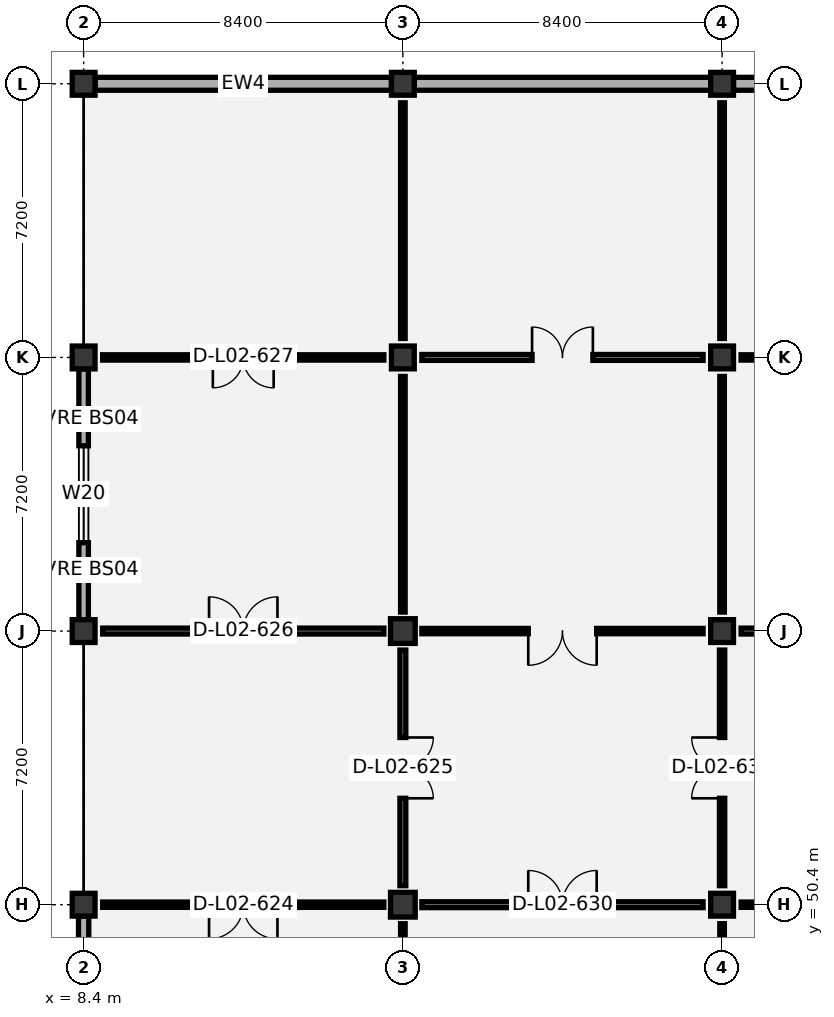
"""IFC4 building model, lengths in metres.
Left out: names, types, materials, properties, quantities, classifications, styles, units other than length and angle.
Written with IfcOpenShell. Run it as: python <this file> out.ifc"""

import sys

from ifc_helpers import new_model, si_unit, direction, frame, frame_2d, origin, origin_2d, place, context, subcontext, project, spatial, rectangle, extrude, element, fill, save


model = new_model("IFC4")
c1 = context("Model", 3, precision=1e-05, world=origin(), true_north=direction((0.0, 1.0)))
c2 = subcontext(c1, "Body", "Model", "MODEL_VIEW")
j1 = project(units=[si_unit("LENGTHUNIT", "METRE"), si_unit("PLANEANGLEUNIT", "RADIAN")], contexts=[c1])
p1 = place(None, origin())
s1 = spatial("IfcSite", under=j1, at=p1, CompositionType="ELEMENT")
p2 = place(p1, origin())
s2 = spatial("IfcBuilding", under=s1, at=p2, CompositionType="ELEMENT")
p3 = place(p2, frame((0.0, 0.0, 11.4)))
s3 = spatial("IfcBuildingStorey", under=s2, at=p3, CompositionType="ELEMENT", Elevation=11.4)
for number, where, z_axis, x_axis in (
    (1, (8.4, 50.4, 0.0), (0.0, 0.0, 1.0), (1.0, 0.0, 0.0)),
    (2, (8.4, 57.6, 0.0), (0.0, 0.0, 1.0), (1.0, 0.0, 0.0)),
    (3, (8.4, 64.8, 0.0), (0.0, 0.0, 1.0), (1.0, 0.0, 0.0)),
    (4, (8.4, 72.0, 0.0), (0.0, 0.0, 1.0), (1.0, 0.0, 0.0)),
):
    element("IfcColumn", number, at=place(p3, frame(where, z_axis=z_axis, x_axis=x_axis)), inside=s3, PredefinedType="COLUMN", context=c2, shape_type="SweptSolid", body=[
        extrude(rectangle(XDim=0.6, YDim=0.6, at=origin_2d()), origin(), (0.0, 0.0, 1.0), 5.4),
    ])
for number, where, z_axis, x_axis in (
    (5, (16.8, 50.4, 0.0), (0.0, 0.0, 1.0), (1.0, 0.0, 0.0)),
    (6, (16.8, 57.6, 0.0), (0.0, 0.0, 1.0), (1.0, 0.0, 0.0)),
):
    element("IfcColumn", number, at=place(p3, frame(where, z_axis=z_axis, x_axis=x_axis)), inside=s3, PredefinedType="COLUMN", context=c2, shape_type="SweptSolid", body=[
        extrude(rectangle(XDim=0.65, YDim=0.65, at=origin_2d()), origin(), (0.0, 0.0, 1.0), 5.4),
    ])
for number, where, z_axis, x_axis in (
    (7, (16.8, 64.8, 0.0), (0.0, 0.0, 1.0), (1.0, 0.0, 0.0)),
    (8, (16.8, 72.0, 0.0), (0.0, 0.0, 1.0), (1.0, 0.0, 0.0)),
    (9, (25.2, 50.4, 0.0), (0.0, 0.0, 1.0), (1.0, 0.0, 0.0)),
    (10, (25.2, 57.6, 0.0), (0.0, 0.0, 1.0), (1.0, 0.0, 0.0)),
    (11, (25.2, 64.8, 0.0), (0.0, 0.0, 1.0), (1.0, 0.0, 0.0)),
    (12, (25.2, 72.0, 0.0), (0.0, 0.0, 1.0), (1.0, 0.0, 0.0)),
):
    element("IfcColumn", number, at=place(p3, frame(where, z_axis=z_axis, x_axis=x_axis)), inside=s3, PredefinedType="COLUMN", context=c2, shape_type="SweptSolid", body=[
        extrude(rectangle(XDim=0.6, YDim=0.6, at=origin_2d()), origin(), (0.0, 0.0, 1.0), 5.4),
    ])
p4 = place(p3, frame((8.4, 43.5, 0.0), z_axis=(0.0, 0.0, 1.0), x_axis=(0.0, 1.0, 0.0)))
e13 = element("IfcWall", 13, at=p4, inside=s3, PredefinedType="SOLIDWALL", context=c2, shape_type="SweptSolid", body=[
    extrude(rectangle(XDim=6.6, YDim=0.27, at=frame_2d((3.3, 0.0))), origin(), (0.0, 0.0, 1.0), 4.445),
])
p5 = place(p4, frame((1.8, 0.0, 0.9)))
e14 = element("IfcOpeningElement", 14, at=p5, cuts=e13, PredefinedType="OPENING", context=c2, shape_type="SweptSolid", body=[
    extrude(rectangle(XDim=3.0, YDim=2.4, at=frame_2d((1.5, 1.2))), frame((0.0, 0.145, 0.0), z_axis=(0.0, -1.0, 0.0), x_axis=(1.0, 0.0, 0.0)), (0.0, 0.0, 1.0), 0.29),
])
p6 = place(p3, frame((8.4, 57.9, 0.0), z_axis=(0.0, 0.0, 1.0), x_axis=(0.0, 1.0, 0.0)))
e15 = element("IfcWall", 15, at=p6, inside=s3, PredefinedType="SOLIDWALL", context=c2, shape_type="SweptSolid", body=[
    extrude(rectangle(XDim=6.6, YDim=0.25, at=frame_2d((3.3, 0.0))), origin(), (0.0, 0.0, 1.0), 4.445),
])
p7 = place(p6, frame((2.025, 0.0, 0.9)))
e16 = element("IfcOpeningElement", 16, at=p7, cuts=e15, PredefinedType="OPENING", context=c2, shape_type="SweptSolid", body=[
    extrude(rectangle(XDim=2.55, YDim=1.95, at=frame_2d((1.275, 0.975))), frame((0.0, 0.135, 0.0), z_axis=(0.0, -1.0, 0.0), x_axis=(1.0, 0.0, 0.0)), (0.0, 0.0, 1.0), 0.27),
])
p8 = place(p3, frame((8.7, 72.0, 0.0), z_axis=(0.0, 0.0, 1.0), x_axis=(1.0, 0.0, 0.0)))
e17 = element("IfcWall", 17, at=p8, inside=s3, PredefinedType="SOLIDWALL", context=c2, shape_type="SweptSolid", body=[
    extrude(rectangle(XDim=7.8, YDim=0.34, at=frame_2d((3.9, 0.0))), origin(), (0.0, 0.0, 1.0), 4.445),
])
p9 = place(p3, frame((17.1, 72.0, 0.0), z_axis=(0.0, 0.0, 1.0), x_axis=(1.0, 0.0, 0.0)))
e18 = element("IfcWall", 18, at=p9, inside=s3, PredefinedType="SOLIDWALL", context=c2, shape_type="SweptSolid", body=[
    extrude(rectangle(XDim=7.8, YDim=0.34, at=frame_2d((3.9, 0.0))), origin(), (0.0, 0.0, 1.0), 4.445),
])
p10 = place(p3, frame((25.5, 72.0, 0.0), z_axis=(0.0, 0.0, 1.0), x_axis=(1.0, 0.0, 0.0)))
e19 = element("IfcWall", 19, at=p10, inside=s3, PredefinedType="SOLIDWALL", context=c2, shape_type="SweptSolid", body=[
    extrude(rectangle(XDim=7.8, YDim=0.34, at=frame_2d((3.9, 0.0))), origin(), (0.0, 0.0, 1.0), 4.445),
])
p11 = place(p3, frame((0.12, 72.0, 0.0), z_axis=(0.0, 0.0, 1.0), x_axis=(1.0, 0.0, 0.0)))
e20 = element("IfcWall", 20, at=p11, inside=s3, PredefinedType="PARAPET", context=c2, shape_type="SweptSolid", body=[
    extrude(rectangle(XDim=8.16, YDim=0.22, at=frame_2d((4.08, 0.0))), origin(), (0.0, 0.0, 1.0), 1.15),
])
p12 = place(p3, frame((16.8, 43.7, 0.0), z_axis=(0.0, 0.0, 1.0), x_axis=(0.0, 1.0, 0.0)))
e21 = element("IfcWall", 21, at=p12, inside=s3, PredefinedType="PARTITIONING", context=c2, shape_type="SweptSolid", body=[
    extrude(rectangle(XDim=6.2, YDim=0.12, at=frame_2d((3.1, 0.0))), origin(), (0.0, 0.0, 1.0), 4.445),
])
p13 = place(p3, frame((8.9, 50.4, 0.0), z_axis=(0.0, 0.0, 1.0), x_axis=(1.0, 0.0, 0.0)))
e22 = element("IfcWall", 22, at=p13, inside=s3, PredefinedType="PARTITIONING", context=c2, shape_type="SweptSolid", body=[
    extrude(rectangle(XDim=7.4, YDim=0.14, at=frame_2d((3.7, 0.0))), origin(), (0.0, 0.0, 1.0), 4.345),
])
p14 = place(p13, frame((2.8, 0.0, 0.0)))
e23 = element("IfcOpeningElement", 23, at=p14, cuts=e22, PredefinedType="OPENING", context=c2, shape_type="SweptSolid", body=[
    extrude(rectangle(XDim=1.8, YDim=2.25, at=frame_2d((0.9, 1.125))), frame((0.0, 0.08, 0.0), z_axis=(0.0, -1.0, 0.0), x_axis=(1.0, 0.0, 0.0)), (0.0, 0.0, 1.0), 0.16),
])
p15 = place(p3, frame((16.8, 50.9, 0.0), z_axis=(0.0, 0.0, 1.0), x_axis=(0.0, 1.0, 0.0)))
e24 = element("IfcWall", 24, at=p15, inside=s3, PredefinedType="PARTITIONING", context=c2, shape_type="SweptSolid", body=[
    extrude(rectangle(XDim=6.2, YDim=0.155, at=frame_2d((3.1, 0.0))), origin(), (0.0, 0.0, 1.0), 4.445),
])
p16 = place(p15, frame((2.3, 0.0, 0.0)))
e25 = element("IfcOpeningElement", 25, at=p16, cuts=e24, PredefinedType="OPENING", context=c2, shape_type="SweptSolid", body=[
    extrude(rectangle(XDim=1.6, YDim=2.2, at=frame_2d((0.8, 1.1))), frame((0.0, 0.087, 0.0), z_axis=(0.0, -1.0, 0.0), x_axis=(1.0, 0.0, 0.0)), (0.0, 0.0, 1.0), 0.175),
])
p17 = place(p3, frame((8.9, 57.6, 0.0), z_axis=(0.0, 0.0, 1.0), x_axis=(1.0, 0.0, 0.0)))
e26 = element("IfcWall", 26, at=p17, inside=s3, PredefinedType="PARTITIONING", context=c2, shape_type="SweptSolid", body=[
    extrude(rectangle(XDim=7.4, YDim=0.155, at=frame_2d((3.7, 0.0))), origin(), (0.0, 0.0, 1.0), 4.345),
])
p18 = place(p17, frame((2.8, 0.0, 0.0)))
e27 = element("IfcOpeningElement", 27, at=p18, cuts=e26, PredefinedType="OPENING", context=c2, shape_type="SweptSolid", body=[
    extrude(rectangle(XDim=1.8, YDim=2.25, at=frame_2d((0.9, 1.125))), frame((0.0, 0.087, 0.0), z_axis=(0.0, -1.0, 0.0), x_axis=(1.0, 0.0, 0.0)), (0.0, 0.0, 1.0), 0.175),
])
p19 = place(p3, frame((16.8, 58.1, 0.0), z_axis=(0.0, 0.0, 1.0), x_axis=(0.0, 1.0, 0.0)))
e28 = element("IfcWall", 28, at=p19, inside=s3, PredefinedType="PARTITIONING", context=c2, shape_type="SweptSolid", body=[
    extrude(rectangle(XDim=6.2, YDim=0.12, at=frame_2d((3.1, 0.0))), origin(), (0.0, 0.0, 1.0), 4.695),
])
p20 = place(p3, frame((8.9, 64.8, 0.0), z_axis=(0.0, 0.0, 1.0), x_axis=(1.0, 0.0, 0.0)))
e29 = element("IfcWall", 29, at=p20, inside=s3, PredefinedType="PARTITIONING", context=c2, shape_type="SweptSolid", body=[
    extrude(rectangle(XDim=7.4, YDim=0.14, at=frame_2d((3.7, 0.0))), origin(), (0.0, 0.0, 1.0), 4.345),
])
p21 = place(p20, frame((2.9, 0.0, 0.0)))
e30 = element("IfcOpeningElement", 30, at=p21, cuts=e29, PredefinedType="OPENING", context=c2, shape_type="SweptSolid", body=[
    extrude(rectangle(XDim=1.6, YDim=2.2, at=frame_2d((0.8, 1.1))), frame((0.0, 0.08, 0.0), z_axis=(0.0, -1.0, 0.0), x_axis=(1.0, 0.0, 0.0)), (0.0, 0.0, 1.0), 0.16),
])
p22 = place(p3, frame((16.8, 65.3, 0.0), z_axis=(0.0, 0.0, 1.0), x_axis=(0.0, 1.0, 0.0)))
e31 = element("IfcWall", 31, at=p22, inside=s3, PredefinedType="PARTITIONING", context=c2, shape_type="SweptSolid", body=[
    extrude(rectangle(XDim=6.2, YDim=0.12, at=frame_2d((3.1, 0.0))), origin(), (0.0, 0.0, 1.0), 4.395),
])
p23 = place(p3, frame((25.2, 43.7, 0.0), z_axis=(0.0, 0.0, 1.0), x_axis=(0.0, 1.0, 0.0)))
e32 = element("IfcWall", 32, at=p23, inside=s3, PredefinedType="PARTITIONING", context=c2, shape_type="SweptSolid", body=[
    extrude(rectangle(XDim=6.2, YDim=0.12, at=frame_2d((3.1, 0.0))), origin(), (0.0, 0.0, 1.0), 5.175),
])
p24 = place(p3, frame((17.3, 50.4, 0.0), z_axis=(0.0, 0.0, 1.0), x_axis=(1.0, 0.0, 0.0)))
e33 = element("IfcWall", 33, at=p24, inside=s3, PredefinedType="PARTITIONING", context=c2, shape_type="SweptSolid", body=[
    extrude(rectangle(XDim=7.4, YDim=0.155, at=frame_2d((3.7, 0.0))), origin(), (0.0, 0.0, 1.0), 5.175),
])
p25 = place(p24, frame((2.8, 0.0, 0.0)))
e34 = element("IfcOpeningElement", 34, at=p25, cuts=e33, PredefinedType="OPENING", context=c2, shape_type="SweptSolid", body=[
    extrude(rectangle(XDim=1.8, YDim=2.25, at=frame_2d((0.9, 1.125))), frame((0.0, 0.087, 0.0), z_axis=(0.0, -1.0, 0.0), x_axis=(1.0, 0.0, 0.0)), (0.0, 0.0, 1.0), 0.175),
])
p26 = place(p3, frame((25.2, 50.9, 0.0), z_axis=(0.0, 0.0, 1.0), x_axis=(0.0, 1.0, 0.0)))
e35 = element("IfcWall", 35, at=p26, inside=s3, PredefinedType="PARTITIONING", context=c2, shape_type="SweptSolid", body=[
    extrude(rectangle(XDim=6.2, YDim=0.14, at=frame_2d((3.1, 0.0))), origin(), (0.0, 0.0, 1.0), 5.175),
])
p27 = place(p26, frame((2.3, 0.0, 0.0)))
e36 = element("IfcOpeningElement", 36, at=p27, cuts=e35, PredefinedType="OPENING", context=c2, shape_type="SweptSolid", body=[
    extrude(rectangle(XDim=1.6, YDim=2.2, at=frame_2d((0.8, 1.1))), frame((0.0, 0.08, 0.0), z_axis=(0.0, -1.0, 0.0), x_axis=(1.0, 0.0, 0.0)), (0.0, 0.0, 1.0), 0.16),
])
p28 = place(p3, frame((17.3, 57.6, 0.0), z_axis=(0.0, 0.0, 1.0), x_axis=(1.0, 0.0, 0.0)))
e37 = element("IfcWall", 37, at=p28, inside=s3, PredefinedType="PARTITIONING", context=c2, shape_type="SweptSolid", body=[
    extrude(rectangle(XDim=7.4, YDim=0.14, at=frame_2d((3.7, 0.0))), origin(), (0.0, 0.0, 1.0), 4.445),
])
p29 = place(p28, frame((2.8, 0.0, 0.0)))
e38 = element("IfcOpeningElement", 38, at=p29, cuts=e37, PredefinedType="OPENING", context=c2, shape_type="SweptSolid", body=[
    extrude(rectangle(XDim=1.8, YDim=2.25, at=frame_2d((0.9, 1.125))), frame((0.0, 0.08, 0.0), z_axis=(0.0, -1.0, 0.0), x_axis=(1.0, 0.0, 0.0)), (0.0, 0.0, 1.0), 0.16),
])
p30 = place(p3, frame((25.2, 58.1, 0.0), z_axis=(0.0, 0.0, 1.0), x_axis=(0.0, 1.0, 0.0)))
e39 = element("IfcWall", 39, at=p30, inside=s3, PredefinedType="PARTITIONING", context=c2, shape_type="SweptSolid", body=[
    extrude(rectangle(XDim=6.2, YDim=0.12, at=frame_2d((3.1, 0.0))), origin(), (0.0, 0.0, 1.0), 4.395),
])
p31 = place(p3, frame((17.3, 64.8, 0.0), z_axis=(0.0, 0.0, 1.0), x_axis=(1.0, 0.0, 0.0)))
e40 = element("IfcWall", 40, at=p31, inside=s3, PredefinedType="PARTITIONING", context=c2, shape_type="SweptSolid", body=[
    extrude(rectangle(XDim=7.4, YDim=0.155, at=frame_2d((3.7, 0.0))), origin(), (0.0, 0.0, 1.0), 4.345),
])
p32 = place(p31, frame((2.9, 0.0, 0.0)))
e41 = element("IfcOpeningElement", 41, at=p32, cuts=e40, PredefinedType="OPENING", context=c2, shape_type="SweptSolid", body=[
    extrude(rectangle(XDim=1.6, YDim=2.2, at=frame_2d((0.8, 1.1))), frame((0.0, 0.087, 0.0), z_axis=(0.0, -1.0, 0.0), x_axis=(1.0, 0.0, 0.0)), (0.0, 0.0, 1.0), 0.175),
])
p33 = place(p3, frame((25.2, 65.3, 0.0), z_axis=(0.0, 0.0, 1.0), x_axis=(0.0, 1.0, 0.0)))
e42 = element("IfcWall", 42, at=p33, inside=s3, PredefinedType="PARTITIONING", context=c2, shape_type="SweptSolid", body=[
    extrude(rectangle(XDim=6.2, YDim=0.12, at=frame_2d((3.1, 0.0))), origin(), (0.0, 0.0, 1.0), 4.805),
])
p34 = place(p3, frame((25.7, 50.4, 0.0), z_axis=(0.0, 0.0, 1.0), x_axis=(1.0, 0.0, 0.0)))
e43 = element("IfcWall", 43, at=p34, inside=s3, PredefinedType="PARTITIONING", context=c2, shape_type="SweptSolid", body=[
    extrude(rectangle(XDim=7.4, YDim=0.14, at=frame_2d((3.7, 0.0))), origin(), (0.0, 0.0, 1.0), 5.175),
])
p35 = place(p34, frame((2.9, 0.0, 0.0)))
e44 = element("IfcOpeningElement", 44, at=p35, cuts=e43, PredefinedType="OPENING", context=c2, shape_type="SweptSolid", body=[
    extrude(rectangle(XDim=1.6, YDim=2.2, at=frame_2d((0.8, 1.1))), frame((0.0, 0.08, 0.0), z_axis=(0.0, -1.0, 0.0), x_axis=(1.0, 0.0, 0.0)), (0.0, 0.0, 1.0), 0.16),
])
p36 = place(p3, frame((25.7, 57.6, 0.0), z_axis=(0.0, 0.0, 1.0), x_axis=(1.0, 0.0, 0.0)))
e45 = element("IfcWall", 45, at=p36, inside=s3, PredefinedType="PARTITIONING", context=c2, shape_type="SweptSolid", body=[
    extrude(rectangle(XDim=7.4, YDim=0.155, at=frame_2d((3.7, 0.0))), origin(), (0.0, 0.0, 1.0), 4.445),
])
p37 = place(p36, frame((2.9, 0.0, 0.0)))
e46 = element("IfcOpeningElement", 46, at=p37, cuts=e45, PredefinedType="OPENING", context=c2, shape_type="SweptSolid", body=[
    extrude(rectangle(XDim=1.6, YDim=2.2, at=frame_2d((0.8, 1.1))), frame((0.0, 0.087, 0.0), z_axis=(0.0, -1.0, 0.0), x_axis=(1.0, 0.0, 0.0)), (0.0, 0.0, 1.0), 0.175),
])
p38 = place(p3, frame((25.7, 64.8, 0.0), z_axis=(0.0, 0.0, 1.0), x_axis=(1.0, 0.0, 0.0)))
e47 = element("IfcWall", 47, at=p38, inside=s3, PredefinedType="PARTITIONING", context=c2, shape_type="SweptSolid", body=[
    extrude(rectangle(XDim=7.4, YDim=0.14, at=frame_2d((3.7, 0.0))), origin(), (0.0, 0.0, 1.0), 4.345),
])
p39 = place(p38, frame((2.8, 0.0, 0.0)))
e48 = element("IfcOpeningElement", 48, at=p39, cuts=e47, PredefinedType="OPENING", context=c2, shape_type="SweptSolid", body=[
    extrude(rectangle(XDim=1.8, YDim=2.25, at=frame_2d((0.9, 1.125))), frame((0.0, 0.08, 0.0), z_axis=(0.0, -1.0, 0.0), x_axis=(1.0, 0.0, 0.0)), (0.0, 0.0, 1.0), 0.16),
])
p40 = place(p7, origin())
e49 = element("IfcWindow", 49, at=p40, inside=s3, PartitioningType="SINGLE_PANEL", PredefinedType="WINDOW", context=c2, shape_type="SweptSolid", body=[
    extrude(rectangle(XDim=2.55, YDim=1.95, at=frame_2d((1.275, 0.975))), frame((0.0, 0.03, 0.0), z_axis=(0.0, -1.0, 0.0), x_axis=(1.0, 0.0, 0.0)), (0.0, 0.0, 1.0), 0.06),
])
fill(e16, e49)
p41 = place(p14, frame((1.8, 0.0, 0.0), z_axis=(0.0, 0.0, 1.0), x_axis=(-1.0, 0.0, 0.0)))
e50 = element("IfcDoor", 50, at=p41, inside=s3, OperationType="DOUBLE_DOOR_SINGLE_SWING", PredefinedType="DOOR", context=c2, shape_type="SweptSolid", body=[
    extrude(rectangle(XDim=1.8, YDim=2.25, at=frame_2d((0.9, 1.125))), frame((0.0, 0.025, 0.0), z_axis=(0.0, -1.0, 0.0), x_axis=(1.0, 0.0, 0.0)), (0.0, 0.0, 1.0), 0.05),
])
fill(e23, e50)
p42 = place(p16, frame((1.6, 0.0, 0.0), z_axis=(0.0, 0.0, 1.0), x_axis=(-1.0, 0.0, 0.0)))
e51 = element("IfcDoor", 51, at=p42, inside=s3, OperationType="DOUBLE_DOOR_SINGLE_SWING", PredefinedType="DOOR", context=c2, shape_type="SweptSolid", body=[
    extrude(rectangle(XDim=1.6, YDim=2.2, at=frame_2d((0.8, 1.1))), frame((0.0, 0.025, 0.0), z_axis=(0.0, -1.0, 0.0), x_axis=(1.0, 0.0, 0.0)), (0.0, 0.0, 1.0), 0.05),
])
fill(e25, e51)
p43 = place(p18, origin())
e52 = element("IfcDoor", 52, at=p43, inside=s3, OperationType="DOUBLE_DOOR_SINGLE_SWING", PredefinedType="DOOR", context=c2, shape_type="SweptSolid", body=[
    extrude(rectangle(XDim=1.8, YDim=2.25, at=frame_2d((0.9, 1.125))), frame((0.0, 0.025, 0.0), z_axis=(0.0, -1.0, 0.0), x_axis=(1.0, 0.0, 0.0)), (0.0, 0.0, 1.0), 0.05),
])
fill(e27, e52)
p44 = place(p21, frame((1.6, 0.0, 0.0), z_axis=(0.0, 0.0, 1.0), x_axis=(-1.0, 0.0, 0.0)))
e53 = element("IfcDoor", 53, at=p44, inside=s3, OperationType="DOUBLE_DOOR_SINGLE_SWING", PredefinedType="DOOR", context=c2, shape_type="SweptSolid", body=[
    extrude(rectangle(XDim=1.6, YDim=2.2, at=frame_2d((0.8, 1.1))), frame((0.0, 0.025, 0.0), z_axis=(0.0, -1.0, 0.0), x_axis=(1.0, 0.0, 0.0)), (0.0, 0.0, 1.0), 0.05),
])
fill(e30, e53)
p45 = place(p25, origin())
e54 = element("IfcDoor", 54, at=p45, inside=s3, OperationType="DOUBLE_DOOR_SINGLE_SWING", PredefinedType="DOOR", context=c2, shape_type="SweptSolid", body=[
    extrude(rectangle(XDim=1.8, YDim=2.25, at=frame_2d((0.9, 1.125))), frame((0.0, 0.025, 0.0), z_axis=(0.0, -1.0, 0.0), x_axis=(1.0, 0.0, 0.0)), (0.0, 0.0, 1.0), 0.05),
])
fill(e34, e54)
p46 = place(p27, origin())
e55 = element("IfcDoor", 55, at=p46, inside=s3, OperationType="DOUBLE_DOOR_SINGLE_SWING", PredefinedType="DOOR", context=c2, shape_type="SweptSolid", body=[
    extrude(rectangle(XDim=1.6, YDim=2.2, at=frame_2d((0.8, 1.1))), frame((0.0, 0.025, 0.0), z_axis=(0.0, -1.0, 0.0), x_axis=(1.0, 0.0, 0.0)), (0.0, 0.0, 1.0), 0.05),
])
fill(e36, e55)
p47 = place(p29, frame((1.8, 0.0, 0.0), z_axis=(0.0, 0.0, 1.0), x_axis=(-1.0, 0.0, 0.0)))
e56 = element("IfcDoor", 56, at=p47, inside=s3, OperationType="DOUBLE_DOOR_SINGLE_SWING", PredefinedType="DOOR", context=c2, shape_type="SweptSolid", body=[
    extrude(rectangle(XDim=1.8, YDim=2.25, at=frame_2d((0.9, 1.125))), frame((0.0, 0.025, 0.0), z_axis=(0.0, -1.0, 0.0), x_axis=(1.0, 0.0, 0.0)), (0.0, 0.0, 1.0), 0.05),
])
fill(e38, e56)
p48 = place(p32, origin())
e57 = element("IfcDoor", 57, at=p48, inside=s3, OperationType="DOUBLE_DOOR_SINGLE_SWING", PredefinedType="DOOR", context=c2, shape_type="SweptSolid", body=[
    extrude(rectangle(XDim=1.6, YDim=2.2, at=frame_2d((0.8, 1.1))), frame((0.0, 0.025, 0.0), z_axis=(0.0, -1.0, 0.0), x_axis=(1.0, 0.0, 0.0)), (0.0, 0.0, 1.0), 0.05),
])
fill(e41, e57)
save(model, sys.argv[1])
